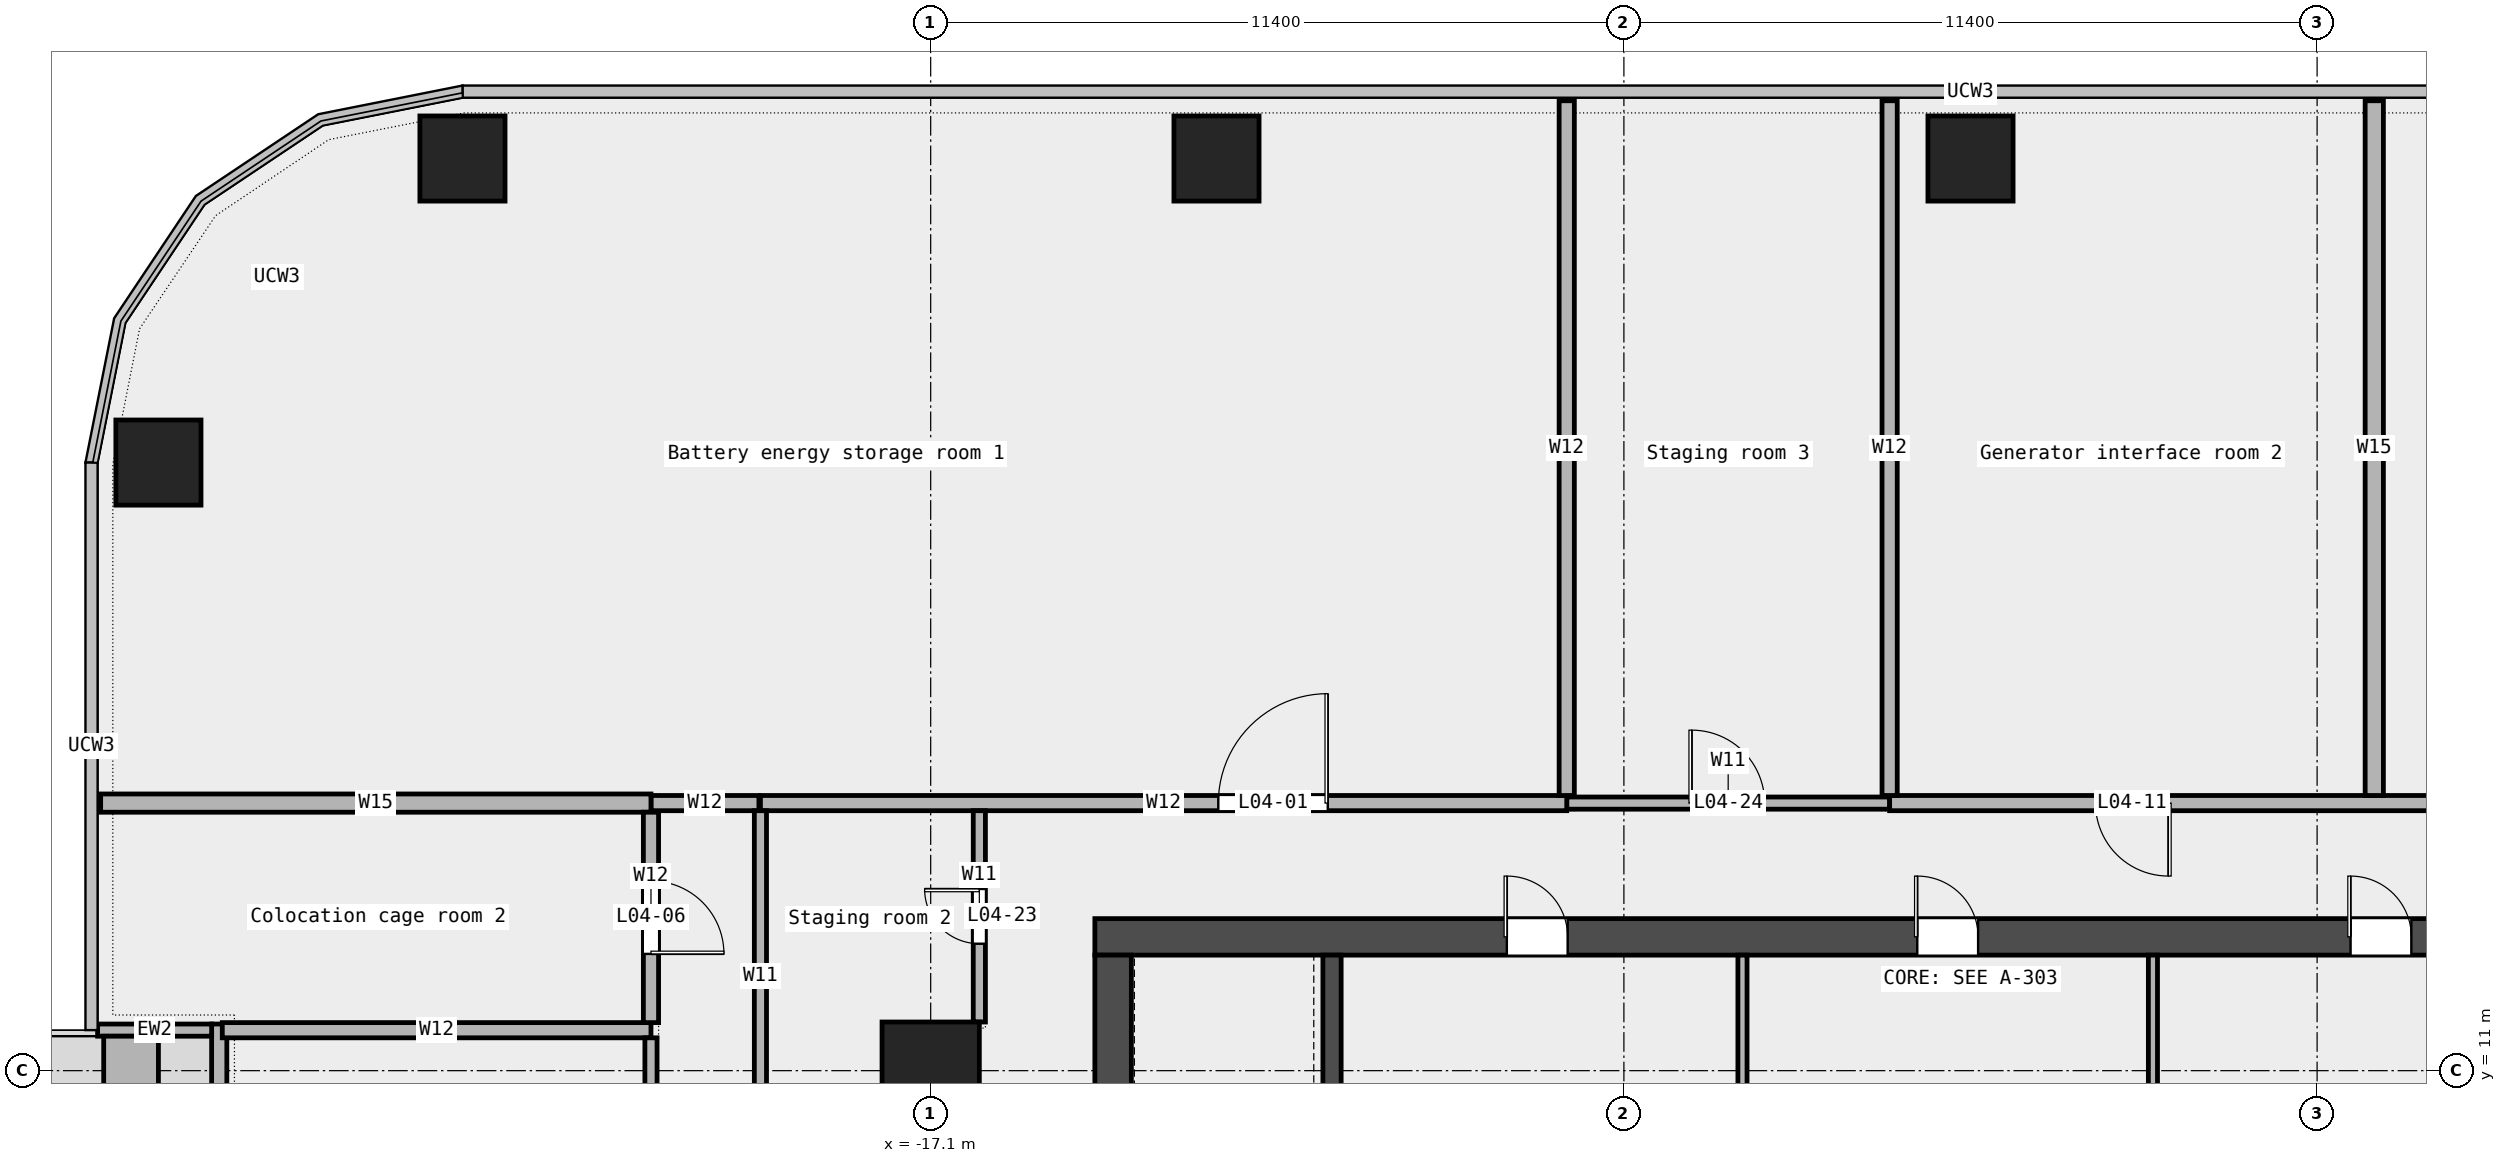
"""IFC4 building model, lengths in metres.
Left out: names, types, materials, properties, quantities, classifications, styles, units other than length and angle.
Written with IfcOpenShell. Run it as: python <this file> out.ifc"""

import sys

from ifc_helpers import new_model, si_unit, direction, frame, frame_2d, origin, origin_2d, place, context, subcontext, project, spatial, rectangle, extrude, element, fill, save


model = new_model("IFC4")
c1 = context("Model", 3, precision=1e-05, world=origin(), true_north=direction((0.0, 1.0)))
c2 = subcontext(c1, "Body", "Model", "MODEL_VIEW")
j1 = project(units=[si_unit("LENGTHUNIT", "METRE"), si_unit("PLANEANGLEUNIT", "RADIAN")], contexts=[c1])
p1 = place(None, origin())
s1 = spatial("IfcSite", under=j1, at=p1, CompositionType="ELEMENT")
p2 = place(p1, origin())
s2 = spatial("IfcBuilding", under=s1, at=p2, CompositionType="ELEMENT")
p3 = place(p2, frame((0.0, 0.0, 25.5)))
s3 = spatial("IfcBuildingStorey", under=s2, at=p3, CompositionType="ELEMENT", Elevation=25.5)
for number, where, z_axis, x_axis in (
    (1, (0.0, 26.0, 0.0), (0.0, 0.0, 1.0), (1.0, 0.0, 0.0)),
    (2, (-12.4, 26.0, 0.0), (0.0, 0.0, 1.0), (1.0, 0.0, 0.0)),
    (3, (-24.8, 26.0, 0.0), (0.0, 0.0, 1.0), (1.0, 0.0, 0.0)),
    (4, (-29.8, 21.0, 0.0), (0.0, 0.0, 1.0), (1.0, 0.0, 0.0)),
):
    element("IfcColumn", number, at=place(p3, frame(where, z_axis=z_axis, x_axis=x_axis)), inside=s3, PredefinedType="COLUMN", context=c2, shape_type="SweptSolid", body=[
        extrude(rectangle(XDim=1.4, YDim=1.4, at=origin_2d()), origin(), (0.0, 0.0, 1.0), 5.05),
    ])
p4 = place(p3, frame((-17.1, 11.0, 0.0), z_axis=(0.0, 0.0, 1.0), x_axis=(1.0, 0.0, 0.0)))
e5 = element("IfcColumn", 5, at=p4, inside=s3, PredefinedType="COLUMN", context=c2, shape_type="SweptSolid", body=[
    extrude(rectangle(XDim=1.6, YDim=1.6, at=origin_2d()), origin(), (0.0, 0.0, 1.0), 5.05),
])
p5 = place(p3, frame((-28.8, 11.767, 0.0), z_axis=(0.0, 0.0, 1.0), x_axis=(0.0, -1.0, 0.0)))
e6 = element("IfcWall", 6, at=p5, inside=s3, PredefinedType="STANDARD", context=c2, shape_type="SweptSolid", body=[
    extrude(rectangle(XDim=14.2, YDim=0.25, at=frame_2d((7.1, 0.0))), origin(), (0.0, 0.0, 1.0), 5.05),
])
p6 = place(p5, frame((1.75, 0.0, 0.45)))
e7 = element("IfcOpeningElement", 7, at=p6, cuts=e6, PredefinedType="OPENING", context=c2, shape_type="SweptSolid", body=[
    extrude(rectangle(XDim=1.5, YDim=3.0, at=frame_2d((0.75, 1.5))), frame((0.0, 0.137, 0.0), z_axis=(0.0, -1.0, 0.0), x_axis=(1.0, 0.0, 0.0)), (0.0, 0.0, 1.0), 0.274),
])
p7 = place(p5, frame((6.25, 0.0, 0.0)))
e8 = element("IfcOpeningElement", 8, at=p7, cuts=e6, PredefinedType="OPENING", context=c2, shape_type="SweptSolid", body=[
    extrude(rectangle(XDim=1.8, YDim=2.4, at=frame_2d((0.9, 1.2))), frame((0.0, 0.137, 0.0), z_axis=(0.0, -1.0, 0.0), x_axis=(1.0, 0.0, 0.0)), (0.0, 0.0, 1.0), 0.274),
])
p8 = place(p5, frame((11.0, 0.0, 0.45)))
e9 = element("IfcOpeningElement", 9, at=p8, cuts=e6, PredefinedType="OPENING", context=c2, shape_type="SweptSolid", body=[
    extrude(rectangle(XDim=1.5, YDim=3.0, at=frame_2d((0.75, 1.5))), frame((0.0, 0.137, 0.0), z_axis=(0.0, -1.0, 0.0), x_axis=(1.0, 0.0, 0.0)), (0.0, 0.0, 1.0), 0.274),
])
p9 = place(p3, frame((-30.8, 11.667, 0.0), z_axis=(0.0, 0.0, 1.0), x_axis=(1.0, 0.0, 0.0)))
e10 = element("IfcWall", 10, at=p9, inside=s3, PredefinedType="STANDARD", context=c2, shape_type="SweptSolid", body=[
    extrude(rectangle(XDim=1.875, YDim=0.2, at=frame_2d((0.938, 0.0))), origin(), (0.0, 0.0, 1.0), 5.05),
])
p10 = place(p3, frame((-30.25, 11.567, 0.0), z_axis=(0.0, 0.0, 1.0), x_axis=(0.0, -1.0, 0.0)))
e11 = element("IfcWall", 11, at=p10, inside=s3, PredefinedType="STANDARD", context=c2, shape_type="SweptSolid", body=[
    extrude(rectangle(XDim=3.6, YDim=0.9, at=frame_2d((1.8, 0.0))), origin(), (0.0, 0.0, 1.0), 0.7),
])
p11 = place(p3, frame((-28.75, 11.665, 0.0), z_axis=(0.0, 0.0, 1.0), x_axis=(1.0, 0.0, 0.0)))
e12 = element("IfcWall", 12, at=p11, inside=s3, PredefinedType="PARTITIONING", context=c2, shape_type="SweptSolid", body=[
    extrude(rectangle(XDim=7.05, YDim=0.25, at=frame_2d((3.525, 0.0))), origin(), (0.0, 0.0, 1.0), 5.05),
])
p12 = place(p3, frame((-6.64, 15.4, 0.0), z_axis=(0.0, 0.0, 1.0), x_axis=(1.0, 0.0, 0.0)))
e13 = element("IfcWall", 13, at=p12, inside=s3, PredefinedType="PARTITIONING", context=c2, shape_type="SweptSolid", body=[
    extrude(rectangle(XDim=5.31, YDim=0.2, at=frame_2d((2.655, 0.0))), origin(), (0.0, 0.0, 1.0), 5.05),
])
p13 = place(p12, frame((2.055, 0.0, 0.0)))
e14 = element("IfcOpeningElement", 14, at=p13, cuts=e13, PredefinedType="OPENING", context=c2, shape_type="SweptSolid", body=[
    extrude(rectangle(XDim=1.2, YDim=2.1, at=frame_2d((0.6, 1.05))), frame((0.0, 0.112, 0.0), z_axis=(0.0, -1.0, 0.0), x_axis=(1.0, 0.0, 0.0)), (0.0, 0.0, 1.0), 0.224),
])
p14 = place(p3, frame((-21.7, 15.4, 0.0), z_axis=(0.0, 0.0, 1.0), x_axis=(1.0, 0.0, 0.0)))
e15 = element("IfcWall", 15, at=p14, inside=s3, PredefinedType="PARTITIONING", context=c2, shape_type="SweptSolid", body=[
    extrude(rectangle(XDim=1.775, YDim=0.25, at=frame_2d((0.887, 0.0))), origin(), (0.0, 0.0, 1.0), 5.05),
])
p15 = place(p3, frame((-19.9, 15.4, 0.0), z_axis=(0.0, 0.0, 1.0), x_axis=(1.0, 0.0, 0.0)))
e16 = element("IfcWall", 16, at=p15, inside=s3, PredefinedType="PARTITIONING", context=c2, shape_type="SweptSolid", body=[
    extrude(rectangle(XDim=13.26, YDim=0.25, at=frame_2d((6.63, 0.0))), origin(), (0.0, 0.0, 1.0), 5.05),
])
p16 = place(p15, frame((7.53, 0.0, 0.0)))
e17 = element("IfcOpeningElement", 17, at=p16, cuts=e16, PredefinedType="OPENING", context=c2, shape_type="SweptSolid", body=[
    extrude(rectangle(XDim=1.8, YDim=2.1, at=frame_2d((0.9, 1.05))), frame((0.0, 0.137, 0.0), z_axis=(0.0, -1.0, 0.0), x_axis=(1.0, 0.0, 0.0)), (0.0, 0.0, 1.0), 0.274),
])
p17 = place(p3, frame((-1.33, 15.4, 0.0), z_axis=(0.0, 0.0, 1.0), x_axis=(1.0, 0.0, 0.0)))
e18 = element("IfcWall", 18, at=p17, inside=s3, PredefinedType="PARTITIONING", context=c2, shape_type="SweptSolid", body=[
    extrude(rectangle(XDim=23.03, YDim=0.25, at=frame_2d((11.515, 0.0))), origin(), (0.0, 0.0, 1.0), 5.05),
])
p18 = place(p17, frame((3.385, 0.0, 0.0)))
e19 = element("IfcOpeningElement", 19, at=p18, cuts=e18, PredefinedType="OPENING", context=c2, shape_type="SweptSolid", body=[
    extrude(rectangle(XDim=1.2, YDim=2.1, at=frame_2d((0.6, 1.05))), frame((0.0, 0.137, 0.0), z_axis=(0.0, -1.0, 0.0), x_axis=(1.0, 0.0, 0.0)), (0.0, 0.0, 1.0), 0.274),
])
p19 = place(p17, frame((11.9, 0.0, 0.0)))
e20 = element("IfcOpeningElement", 20, at=p19, cuts=e18, PredefinedType="OPENING", context=c2, shape_type="SweptSolid", body=[
    extrude(rectangle(XDim=1.8, YDim=2.1, at=frame_2d((0.9, 1.05))), frame((0.0, 0.137, 0.0), z_axis=(0.0, -1.0, 0.0), x_axis=(1.0, 0.0, 0.0)), (0.0, 0.0, 1.0), 0.274),
])
p20 = place(p3, frame((-30.75, 15.4, 0.0), z_axis=(0.0, 0.0, 1.0), x_axis=(1.0, 0.0, 0.0)))
e21 = element("IfcWall", 21, at=p20, inside=s3, PredefinedType="PARTITIONING", context=c2, shape_type="SweptSolid", body=[
    extrude(rectangle(XDim=9.05, YDim=0.3, at=frame_2d((4.525, 0.0))), origin(), (0.0, 0.0, 1.0), 5.05),
])
p21 = place(p3, frame((-21.7, -2.21, 0.0), z_axis=(0.0, 0.0, 1.0), x_axis=(0.0, 1.0, 0.0)))
e22 = element("IfcWall", 22, at=p21, inside=s3, PredefinedType="PARTITIONING", context=c2, shape_type="SweptSolid", body=[
    extrude(rectangle(XDim=13.75, YDim=0.2, at=frame_2d((6.875, 0.0))), origin(), (0.0, 0.0, 1.0), 5.05),
])
p22 = place(p21, frame((6.125, 0.0, 0.0)))
e23 = element("IfcOpeningElement", 23, at=p22, cuts=e22, PredefinedType="OPENING", context=c2, shape_type="SweptSolid", body=[
    extrude(rectangle(XDim=1.5, YDim=2.1, at=frame_2d((0.75, 1.05))), frame((0.0, 0.112, 0.0), z_axis=(0.0, -1.0, 0.0), x_axis=(1.0, 0.0, 0.0)), (0.0, 0.0, 1.0), 0.224),
])
p23 = place(p3, frame((-21.7, 11.79, 0.0), z_axis=(0.0, 0.0, 1.0), x_axis=(0.0, 1.0, 0.0)))
e24 = element("IfcWall", 24, at=p23, inside=s3, PredefinedType="PARTITIONING", context=c2, shape_type="SweptSolid", body=[
    extrude(rectangle(XDim=3.46, YDim=0.25, at=frame_2d((1.73, 0.0))), origin(), (0.0, 0.0, 1.0), 5.05),
])
p24 = place(p23, frame((1.13, 0.0, 0.0)))
e25 = element("IfcOpeningElement", 25, at=p24, cuts=e24, PredefinedType="OPENING", context=c2, shape_type="SweptSolid", body=[
    extrude(rectangle(XDim=1.2, YDim=2.1, at=frame_2d((0.6, 1.05))), frame((0.0, 0.137, 0.0), z_axis=(0.0, -1.0, 0.0), x_axis=(1.0, 0.0, 0.0)), (0.0, 0.0, 1.0), 0.274),
])
p25 = place(p3, frame((-19.9, 9.85, 0.0), z_axis=(0.0, 0.0, 1.0), x_axis=(0.0, 1.0, 0.0)))
e26 = element("IfcWall", 26, at=p25, inside=s3, PredefinedType="PARTITIONING", context=c2, shape_type="SweptSolid", body=[
    extrude(rectangle(XDim=5.425, YDim=0.2, at=frame_2d((2.712, 0.0))), origin(), (0.0, 0.0, 1.0), 5.05),
])
p26 = place(p3, frame((-16.3, 11.8, 0.0), z_axis=(0.0, 0.0, 1.0), x_axis=(0.0, 1.0, 0.0)))
e27 = element("IfcWall", 27, at=p26, inside=s3, PredefinedType="PARTITIONING", context=c2, shape_type="SweptSolid", body=[
    extrude(rectangle(XDim=3.475, YDim=0.2, at=frame_2d((1.737, 0.0))), origin(), (0.0, 0.0, 1.0), 5.05),
])
p27 = place(p26, frame((1.288, 0.0, 0.0)))
e28 = element("IfcOpeningElement", 28, at=p27, cuts=e27, PredefinedType="OPENING", context=c2, shape_type="SweptSolid", body=[
    extrude(rectangle(XDim=0.9, YDim=2.1, at=frame_2d((0.45, 1.05))), frame((0.0, 0.112, 0.0), z_axis=(0.0, -1.0, 0.0), x_axis=(1.0, 0.0, 0.0)), (0.0, 0.0, 1.0), 0.224),
])
for number, where, z_axis, x_axis in (
    (29, (-6.64, 15.525, 0.0), (0.0, 0.0, 1.0), (0.0, 1.0, 0.0)),
    (30, (-1.33, 15.525, 0.0), (0.0, 0.0, 1.0), (0.0, 1.0, 0.0)),
):
    element("IfcWall", number, at=place(p3, frame(where, z_axis=z_axis, x_axis=x_axis)), inside=s3, PredefinedType="PARTITIONING", context=c2, shape_type="SweptSolid", body=[
        extrude(rectangle(XDim=11.425, YDim=0.25, at=frame_2d((5.712, 0.0))), origin(), (0.0, 0.0, 1.0), 5.05),
    ])
p28 = place(p3, frame((6.64, 15.525, 0.0), z_axis=(0.0, 0.0, 1.0), x_axis=(0.0, 1.0, 0.0)))
e31 = element("IfcWall", 31, at=p28, inside=s3, PredefinedType="PARTITIONING", context=c2, shape_type="SweptSolid", body=[
    extrude(rectangle(XDim=11.425, YDim=0.3, at=frame_2d((5.712, 0.0))), origin(), (0.0, 0.0, 1.0), 5.05),
])
p29 = place(p3, frame((-14.4, 13.2, 0.0), z_axis=(0.0, 0.0, 1.0), x_axis=(1.0, 0.0, 0.0)))
e32 = element("IfcWall", 32, at=p29, inside=s3, PredefinedType="SHEAR", context=c2, shape_type="SweptSolid", body=[
    extrude(rectangle(XDim=28.8, YDim=0.6, at=frame_2d((14.4, 0.0))), origin(), (0.0, 0.0, 1.0), 5.2),
])
p30 = place(p29, frame((6.775, 0.0, 0.0)))
e33 = element("IfcOpeningElement", 33, at=p30, cuts=e32, PredefinedType="OPENING", context=c2, shape_type="SweptSolid", body=[
    extrude(rectangle(XDim=1.0, YDim=2.1, at=frame_2d((0.5, 1.05))), frame((0.0, 0.312, 0.0), z_axis=(0.0, -1.0, 0.0), x_axis=(1.0, 0.0, 0.0)), (0.0, 0.0, 1.0), 0.624),
])
p31 = place(p29, frame((13.525, 0.0, 0.0)))
e34 = element("IfcOpeningElement", 34, at=p31, cuts=e32, PredefinedType="OPENING", context=c2, shape_type="SweptSolid", body=[
    extrude(rectangle(XDim=1.0, YDim=2.1, at=frame_2d((0.5, 1.05))), frame((0.0, 0.312, 0.0), z_axis=(0.0, -1.0, 0.0), x_axis=(1.0, 0.0, 0.0)), (0.0, 0.0, 1.0), 0.624),
])
p32 = place(p29, frame((20.65, 0.0, 0.0)))
e35 = element("IfcOpeningElement", 35, at=p32, cuts=e32, PredefinedType="OPENING", context=c2, shape_type="SweptSolid", body=[
    extrude(rectangle(XDim=1.0, YDim=2.1, at=frame_2d((0.5, 1.05))), frame((0.0, 0.312, 0.0), z_axis=(0.0, -1.0, 0.0), x_axis=(1.0, 0.0, 0.0)), (0.0, 0.0, 1.0), 0.624),
])
p33 = place(p3, frame((-14.1, -6.6, 0.0), z_axis=(0.0, 0.0, 1.0), x_axis=(0.0, 1.0, 0.0)))
e36 = element("IfcWall", 36, at=p33, inside=s3, PredefinedType="SHEAR", context=c2, shape_type="SweptSolid", body=[
    extrude(rectangle(XDim=19.5, YDim=0.6, at=frame_2d((9.75, 0.0))), origin(), (0.0, 0.0, 1.0), 5.2),
])
p34 = place(p33, frame((9.3, 0.0, 0.0)))
e37 = element("IfcOpeningElement", 37, at=p34, cuts=e36, PredefinedType="OPENING", context=c2, shape_type="SweptSolid", body=[
    extrude(rectangle(XDim=1.8, YDim=2.1, at=frame_2d((0.9, 1.05))), frame((0.0, 0.312, 0.0), z_axis=(0.0, -1.0, 0.0), x_axis=(1.0, 0.0, 0.0)), (0.0, 0.0, 1.0), 0.624),
])
p35 = place(p3, frame((-10.5, 5.25, 0.0), z_axis=(0.0, 0.0, 1.0), x_axis=(0.0, 1.0, 0.0)))
e38 = element("IfcWall", 38, at=p35, inside=s3, PredefinedType="SHEAR", context=c2, shape_type="SweptSolid", body=[
    extrude(rectangle(XDim=7.65, YDim=0.3, at=frame_2d((3.825, 0.0))), origin(), (0.0, 0.0, 1.0), 5.2),
])
for number, where, z_axis, x_axis in (
    (39, (-3.75, 8.55, 0.0), (0.0, 0.0, 1.0), (0.0, 1.0, 0.0)),
    (40, (3.0, 8.55, 0.0), (0.0, 0.0, 1.0), (0.0, 1.0, 0.0)),
):
    element("IfcWall", number, at=place(p3, frame(where, z_axis=z_axis, x_axis=x_axis)), inside=s3, PredefinedType="PARTITIONING", context=c2, shape_type="SweptSolid", body=[
        extrude(rectangle(XDim=4.35, YDim=0.15, at=frame_2d((2.175, 0.0))), origin(), (0.0, 0.0, 1.0), 5.2),
    ])
p36 = place(p16, origin())
e41 = element("IfcDoor", 41, at=p36, inside=s3, OperationType="DOUBLE_DOOR_SINGLE_SWING", PredefinedType="DOOR", context=c2, shape_type="SweptSolid", body=[
    extrude(rectangle(XDim=1.8, YDim=2.1, at=frame_2d((0.9, 1.05))), frame((0.0, 0.025, 0.0), z_axis=(0.0, -1.0, 0.0), x_axis=(1.0, 0.0, 0.0)), (0.0, 0.0, 1.0), 0.05),
])
fill(e17, e41)
p37 = place(p24, origin())
e42 = element("IfcDoor", 42, at=p37, inside=s3, OperationType="SINGLE_SWING_RIGHT", PredefinedType="DOOR", context=c2, shape_type="SweptSolid", body=[
    extrude(rectangle(XDim=1.2, YDim=2.1, at=frame_2d((0.6, 1.05))), frame((0.0, 0.025, 0.0), z_axis=(0.0, -1.0, 0.0), x_axis=(1.0, 0.0, 0.0)), (0.0, 0.0, 1.0), 0.05),
])
fill(e25, e42)
p38 = place(p18, origin())
e43 = element("IfcDoor", 43, at=p38, inside=s3, OperationType="SINGLE_SWING_LEFT", PredefinedType="DOOR", context=c2, shape_type="SweptSolid", body=[
    extrude(rectangle(XDim=1.2, YDim=2.1, at=frame_2d((0.6, 1.05))), frame((0.0, 0.025, 0.0), z_axis=(0.0, -1.0, 0.0), x_axis=(1.0, 0.0, 0.0)), (0.0, 0.0, 1.0), 0.05),
])
fill(e19, e43)
p39 = place(p27, origin())
e44 = element("IfcDoor", 44, at=p39, inside=s3, OperationType="SINGLE_SWING_RIGHT", PredefinedType="DOOR", context=c2, shape_type="SweptSolid", body=[
    extrude(rectangle(XDim=0.9, YDim=2.1, at=frame_2d((0.45, 1.05))), frame((0.0, 0.025, 0.0), z_axis=(0.0, -1.0, 0.0), x_axis=(1.0, 0.0, 0.0)), (0.0, 0.0, 1.0), 0.05),
])
fill(e28, e44)
p40 = place(p13, origin())
e45 = element("IfcDoor", 45, at=p40, inside=s3, OperationType="SINGLE_SWING_LEFT", PredefinedType="DOOR", context=c2, shape_type="SweptSolid", body=[
    extrude(rectangle(XDim=1.2, YDim=2.1, at=frame_2d((0.6, 1.05))), frame((0.0, 0.025, 0.0), z_axis=(0.0, -1.0, 0.0), x_axis=(1.0, 0.0, 0.0)), (0.0, 0.0, 1.0), 0.05),
])
fill(e14, e45)
p41 = place(p30, origin())
e46 = element("IfcDoor", 46, at=p41, inside=s3, OperationType="SINGLE_SWING_LEFT", PredefinedType="DOOR", context=c2, shape_type="SweptSolid", body=[
    extrude(rectangle(XDim=1.0, YDim=2.1, at=frame_2d((0.5, 1.05))), frame((0.0, 0.025, 0.0), z_axis=(0.0, -1.0, 0.0), x_axis=(1.0, 0.0, 0.0)), (0.0, 0.0, 1.0), 0.05),
])
fill(e33, e46)
p42 = place(p31, origin())
e47 = element("IfcDoor", 47, at=p42, inside=s3, OperationType="SINGLE_SWING_LEFT", PredefinedType="DOOR", context=c2, shape_type="SweptSolid", body=[
    extrude(rectangle(XDim=1.0, YDim=2.1, at=frame_2d((0.5, 1.05))), frame((0.0, 0.025, 0.0), z_axis=(0.0, -1.0, 0.0), x_axis=(1.0, 0.0, 0.0)), (0.0, 0.0, 1.0), 0.05),
])
fill(e34, e47)
p43 = place(p32, origin())
e48 = element("IfcDoor", 48, at=p43, inside=s3, OperationType="SINGLE_SWING_LEFT", PredefinedType="DOOR", context=c2, shape_type="SweptSolid", body=[
    extrude(rectangle(XDim=1.0, YDim=2.1, at=frame_2d((0.5, 1.05))), frame((0.0, 0.025, 0.0), z_axis=(0.0, -1.0, 0.0), x_axis=(1.0, 0.0, 0.0)), (0.0, 0.0, 1.0), 0.05),
])
fill(e35, e48)
save(model, sys.argv[1])
